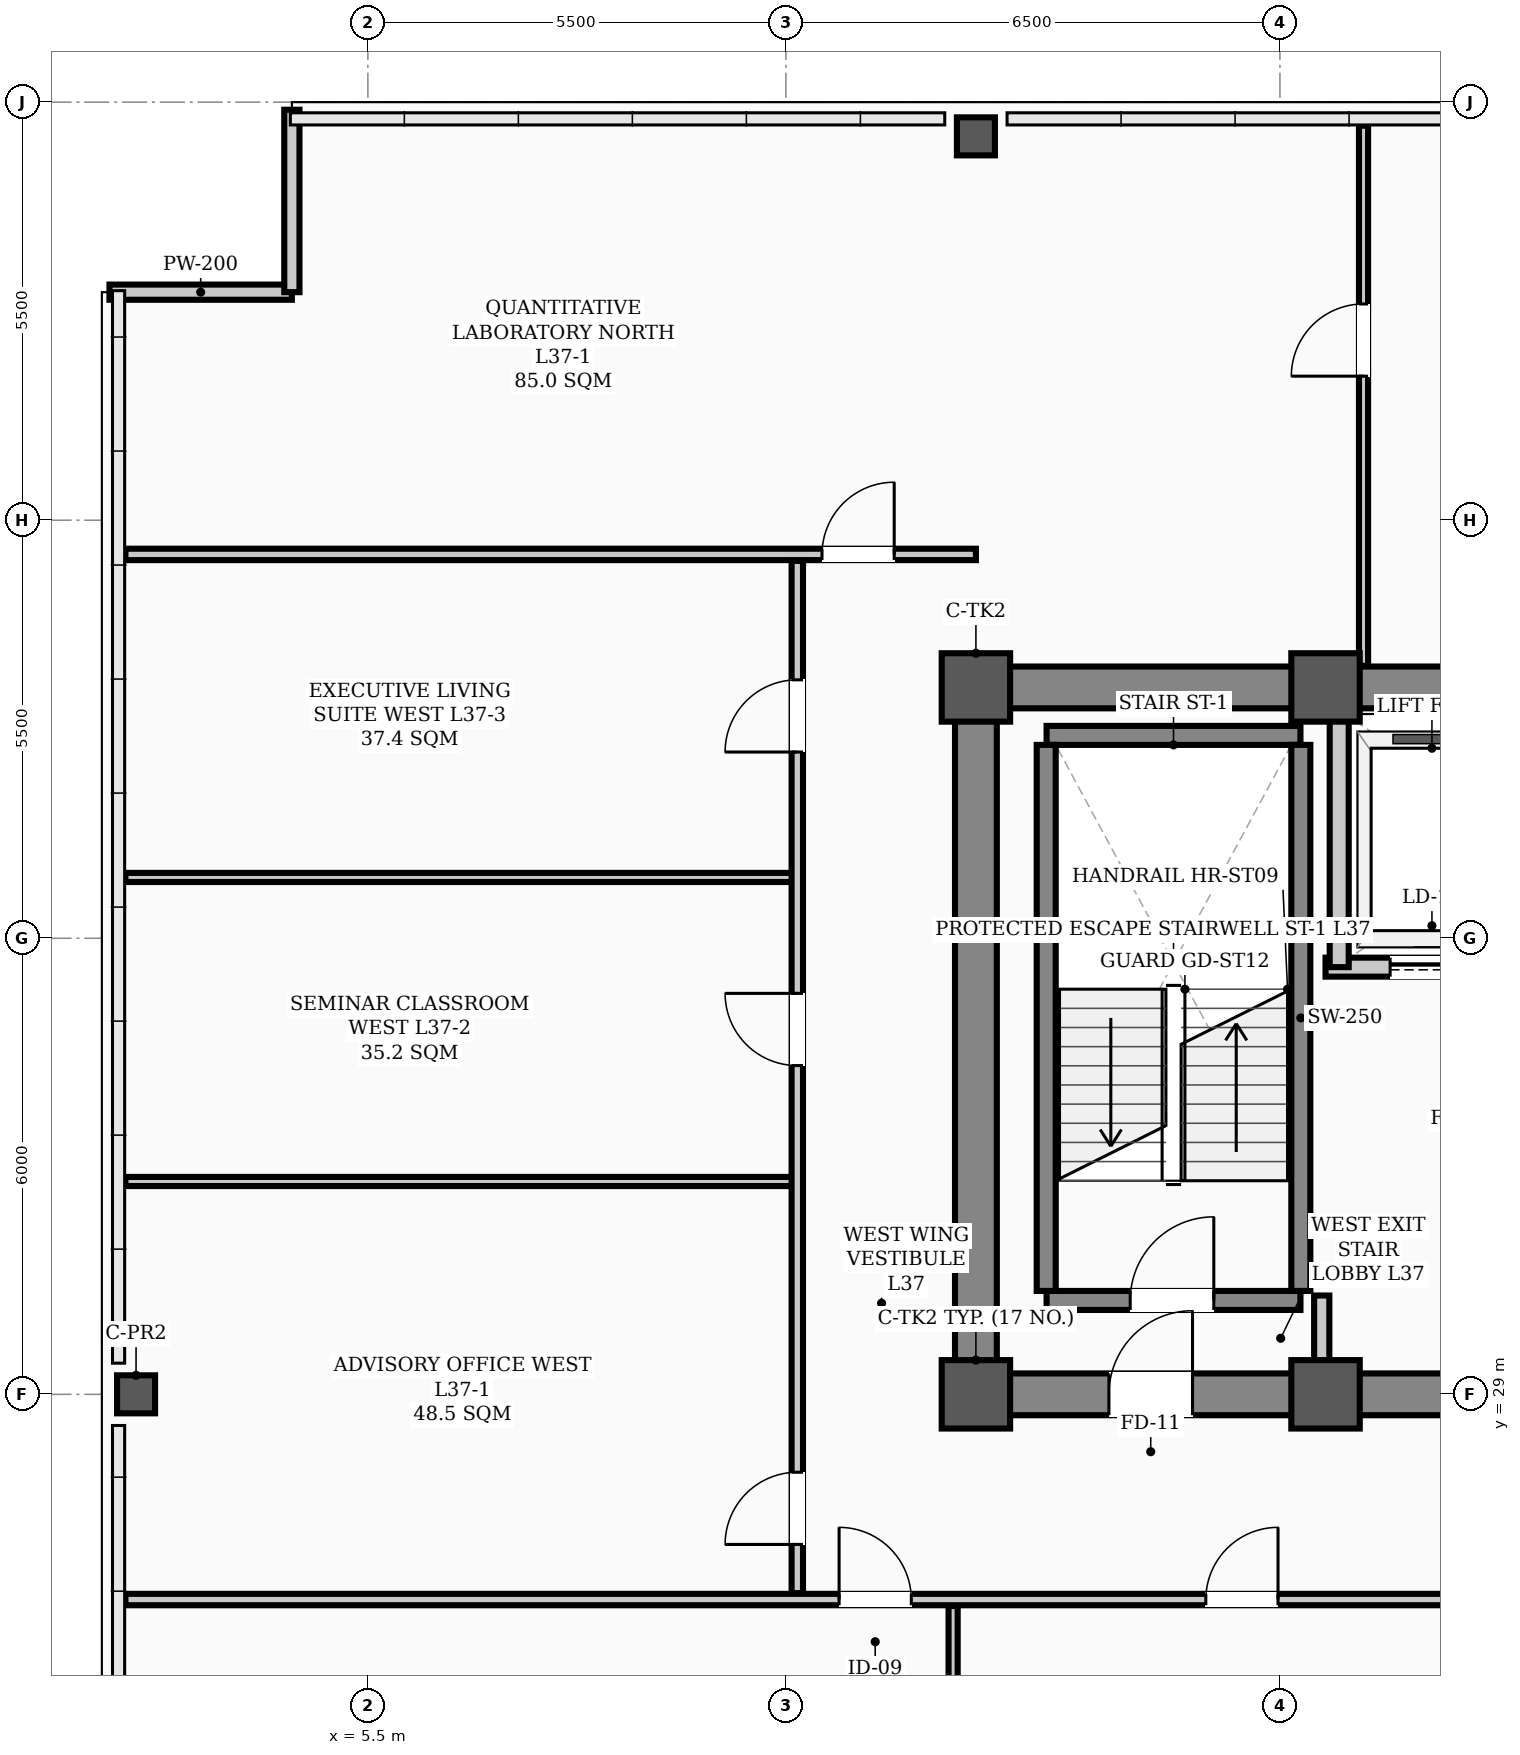
"""IFC4 building model, lengths in metres.
Left out: names, types, materials, properties, quantities, classifications, styles, units other than length and angle.
Written with IfcOpenShell. Run it as: python <this file> out.ifc"""

import sys

from ifc_helpers import new_model, si_unit, direction, frame, frame_2d, origin, origin_2d, place, context, subcontext, project, spatial, rectangle, hollow_rectangle, extrude, element, fill, save


model = new_model("IFC4")
c1 = context("Model", 3, precision=1e-05, world=origin(), true_north=direction((0.0, 1.0)))
c2 = subcontext(c1, "Body", "Model", "MODEL_VIEW")
j1 = project(units=[si_unit("LENGTHUNIT", "METRE"), si_unit("PLANEANGLEUNIT", "RADIAN")], contexts=[c1])
p1 = place(None, origin())
s1 = spatial("IfcSite", under=j1, at=p1, CompositionType="ELEMENT")
p2 = place(p1, origin())
s2 = spatial("IfcBuilding", under=s1, at=p2, CompositionType="ELEMENT")
p3 = place(p2, frame((0.0, 0.0, 150.0)))
s3 = spatial("IfcBuildingStorey", under=s2, at=p3, CompositionType="ELEMENT", Elevation=150.0)
for number, where, z_axis, x_axis in (
    (1, (13.5, 29.0, 0.0), (0.0, 0.0, 1.0), (1.0, 0.0, 0.0)),
    (2, (13.5, 38.3, 0.0), (0.0, 0.0, 1.0), (1.0, 0.0, 0.0)),
    (3, (18.1, 29.0, 0.0), (0.0, 0.0, 1.0), (1.0, 0.0, 0.0)),
    (4, (18.1, 38.3, 0.0), (0.0, 0.0, 1.0), (1.0, 0.0, 0.0)),
):
    element("IfcColumn", number, at=place(p3, frame(where, z_axis=z_axis, x_axis=x_axis)), inside=s3, PredefinedType="COLUMN", context=c2, shape_type="SweptSolid", body=[
        extrude(hollow_rectangle(XDim=0.9, YDim=0.9, WallThickness=0.035, InnerFilletRadius=0.017, OuterFilletRadius=0.052, at=origin_2d()), origin(), (0.0, 0.0, 1.0), 3.9),
    ])
for number, where, z_axis, x_axis in (
    (5, (2.45, 29.0, 0.0), (0.0, 0.0, 1.0), (1.0, 0.0, 0.0)),
    (6, (13.5, 45.55, 0.0), (0.0, 0.0, 1.0), (1.0, 0.0, 0.0)),
):
    element("IfcColumn", number, at=place(p3, frame(where, z_axis=z_axis, x_axis=x_axis)), inside=s3, PredefinedType="COLUMN", context=c2, shape_type="SweptSolid", body=[
        extrude(hollow_rectangle(XDim=0.5, YDim=0.5, WallThickness=0.024, InnerFilletRadius=0.012, OuterFilletRadius=0.036, at=origin_2d()), origin(), (0.0, 0.0, 1.0), 3.9),
    ])
for number, where, z_axis, x_axis in (
    (7, (2.1, 43.5, 0.0), (0.0, 0.0, 1.0), (1.0, 0.0, 0.0)),
    (8, (4.5, 43.5, 0.0), (0.0, 0.0, 1.0), (0.0, 1.0, 0.0)),
):
    element("IfcWall", number, at=place(p3, frame(where, z_axis=z_axis, x_axis=x_axis)), inside=s3, PredefinedType="PARAPET", context=c2, shape_type="SweptSolid", body=[
        extrude(rectangle(XDim=2.4, YDim=0.2, at=frame_2d((1.2, 0.0))), origin(), (0.0, 0.0, 1.0), 1.2),
    ])
p4 = place(p3, frame((13.5, 29.0, 0.0), z_axis=(0.0, 0.0, 1.0), x_axis=(1.0, 0.0, 0.0)))
e9 = element("IfcWall", 9, at=p4, inside=s3, PredefinedType="SHEAR", context=c2, shape_type="SweptSolid", body=[
    extrude(rectangle(XDim=30.5, YDim=0.55, at=frame_2d((15.25, 0.0))), origin(), (0.0, 0.0, 1.0), 3.72),
])
p5 = place(p4, frame((1.75, 0.0, 0.0)))
e10 = element("IfcOpeningElement", 10, at=p5, cuts=e9, PredefinedType="OPENING", context=c2, shape_type="SweptSolid", body=[
    extrude(rectangle(XDim=1.1, YDim=2.08, at=frame_2d((0.55, 1.04))), frame((0.0, 0.285, 0.0), z_axis=(0.0, -1.0, 0.0), x_axis=(1.0, 0.0, 0.0)), (0.0, 0.0, 1.0), 0.57),
])
p6 = place(p4, frame((26.7, 0.0, 0.0)))
e11 = element("IfcOpeningElement", 11, at=p6, cuts=e9, PredefinedType="OPENING", context=c2, shape_type="SweptSolid", body=[
    extrude(rectangle(XDim=1.1, YDim=2.08, at=frame_2d((0.55, 1.04))), frame((0.0, 0.285, 0.0), z_axis=(0.0, -1.0, 0.0), x_axis=(1.0, 0.0, 0.0)), (0.0, 0.0, 1.0), 0.57),
])
p7 = place(p4, frame((6.8, 0.0, 0.0)))
e12 = element("IfcOpeningElement", 12, at=p7, cuts=e9, PredefinedType="OPENING", context=c2, shape_type="SweptSolid", body=[
    extrude(rectangle(XDim=1.1, YDim=2.08, at=frame_2d((0.55, 1.04))), frame((0.0, 0.285, 0.0), z_axis=(0.0, -1.0, 0.0), x_axis=(1.0, 0.0, 0.0)), (0.0, 0.0, 1.0), 0.57),
])
p8 = place(p4, frame((13.2, 0.0, 0.0)))
e13 = element("IfcOpeningElement", 13, at=p8, cuts=e9, PredefinedType="OPENING", context=c2, shape_type="SweptSolid", body=[
    extrude(rectangle(XDim=1.6, YDim=2.08, at=frame_2d((0.8, 1.04))), frame((0.0, 0.285, 0.0), z_axis=(0.0, -1.0, 0.0), x_axis=(1.0, 0.0, 0.0)), (0.0, 0.0, 1.0), 0.57),
])
p9 = place(p4, frame((19.5, 0.0, 0.0)))
e14 = element("IfcOpeningElement", 14, at=p9, cuts=e9, PredefinedType="OPENING", context=c2, shape_type="SweptSolid", body=[
    extrude(rectangle(XDim=0.9, YDim=2.08, at=frame_2d((0.45, 1.04))), frame((0.0, 0.285, 0.0), z_axis=(0.0, -1.0, 0.0), x_axis=(1.0, 0.0, 0.0)), (0.0, 0.0, 1.0), 0.57),
])
p10 = place(p4, frame((21.55, 0.0, 0.0)))
e15 = element("IfcOpeningElement", 15, at=p10, cuts=e9, PredefinedType="OPENING", context=c2, shape_type="SweptSolid", body=[
    extrude(rectangle(XDim=0.9, YDim=2.08, at=frame_2d((0.45, 1.04))), frame((0.0, 0.285, 0.0), z_axis=(0.0, -1.0, 0.0), x_axis=(1.0, 0.0, 0.0)), (0.0, 0.0, 1.0), 0.57),
])
p11 = place(p3, frame((13.5, 38.3, 0.0), z_axis=(0.0, 0.0, 1.0), x_axis=(1.0, 0.0, 0.0)))
e16 = element("IfcWall", 16, at=p11, inside=s3, PredefinedType="SHEAR", context=c2, shape_type="SweptSolid", body=[
    extrude(rectangle(XDim=30.5, YDim=0.55, at=frame_2d((15.25, 0.0))), origin(), (0.0, 0.0, 1.0), 3.72),
])
p12 = place(p3, frame((13.5, 29.35, 0.0), z_axis=(0.0, 0.0, 1.0), x_axis=(0.0, 1.0, 0.0)))
e17 = element("IfcWall", 17, at=p12, inside=s3, PredefinedType="SHEAR", context=c2, shape_type="SweptSolid", body=[
    extrude(rectangle(XDim=8.6, YDim=0.55, at=frame_2d((4.3, 0.0))), origin(), (0.0, 0.0, 1.0), 3.72),
])
p13 = place(p3, frame((14.43, 30.235, 0.0), z_axis=(0.0, 0.0, 1.0), x_axis=(1.0, 0.0, 0.0)))
e18 = element("IfcWall", 18, at=p13, inside=s3, PredefinedType="STANDARD", context=c2, shape_type="SweptSolid", body=[
    extrude(rectangle(XDim=3.34, YDim=0.25, at=frame_2d((1.67, 0.0))), origin(), (0.0, 0.0, 1.0), 3.72),
])
p14 = place(p13, frame((1.1, 0.0, 0.0)))
e19 = element("IfcOpeningElement", 19, at=p14, cuts=e18, PredefinedType="OPENING", context=c2, shape_type="SweptSolid", body=[
    extrude(rectangle(XDim=1.1, YDim=2.08, at=frame_2d((0.55, 1.04))), frame((0.0, 0.135, 0.0), z_axis=(0.0, -1.0, 0.0), x_axis=(1.0, 0.0, 0.0)), (0.0, 0.0, 1.0), 0.27),
])
p15 = place(p3, frame((14.43, 37.669, 0.0), z_axis=(0.0, 0.0, 1.0), x_axis=(1.0, 0.0, 0.0)))
e20 = element("IfcWall", 20, at=p15, inside=s3, PredefinedType="STANDARD", context=c2, shape_type="SweptSolid", body=[
    extrude(rectangle(XDim=3.34, YDim=0.25, at=frame_2d((1.67, 0.0))), origin(), (0.0, 0.0, 1.0), 3.72),
])
for number, where, z_axis, x_axis in (
    (21, (14.425, 30.36, 0.0), (0.0, 0.0, 1.0), (0.0, 1.0, 0.0)),
    (22, (17.775, 30.36, 0.0), (0.0, 0.0, 1.0), (0.0, 1.0, 0.0)),
):
    element("IfcWall", number, at=place(p3, frame(where, z_axis=z_axis, x_axis=x_axis)), inside=s3, PredefinedType="STANDARD", context=c2, shape_type="SweptSolid", body=[
        extrude(rectangle(XDim=7.184, YDim=0.25, at=frame_2d((3.592, 0.0))), origin(), (0.0, 0.0, 1.0), 3.72),
    ])
p16 = place(p3, frame((18.1, 34.62, 0.0), z_axis=(0.0, 0.0, 1.0), x_axis=(1.0, 0.0, 0.0)))
e23 = element("IfcWall", 23, at=p16, inside=s3, PredefinedType="STANDARD", context=c2, shape_type="SweptSolid", body=[
    extrude(rectangle(XDim=5.35, YDim=0.25, at=frame_2d((2.675, 0.0))), origin(), (0.0, 0.0, 1.0), 3.72),
])
p17 = place(p16, frame((0.85, 0.0, 0.0)))
e24 = element("IfcOpeningElement", 24, at=p17, cuts=e23, PredefinedType="OPENING", context=c2, shape_type="SweptSolid", body=[
    extrude(rectangle(XDim=1.1, YDim=2.08, at=frame_2d((0.55, 1.04))), frame((0.0, 0.135, 0.0), z_axis=(0.0, -1.0, 0.0), x_axis=(1.0, 0.0, 0.0)), (0.0, 0.0, 1.0), 0.27),
])
p18 = place(p16, frame((3.45, 0.0, 0.0)))
e25 = element("IfcOpeningElement", 25, at=p18, cuts=e23, PredefinedType="OPENING", context=c2, shape_type="SweptSolid", body=[
    extrude(rectangle(XDim=1.1, YDim=2.08, at=frame_2d((0.55, 1.04))), frame((0.0, 0.135, 0.0), z_axis=(0.0, -1.0, 0.0), x_axis=(1.0, 0.0, 0.0)), (0.0, 0.0, 1.0), 0.27),
])
p19 = place(p3, frame((18.28, 34.62, 0.0), z_axis=(0.0, 0.0, 1.0), x_axis=(0.0, 1.0, 0.0)))
e26 = element("IfcWall", 26, at=p19, inside=s3, PredefinedType="STANDARD", context=c2, shape_type="SweptSolid", body=[
    extrude(rectangle(XDim=3.33, YDim=0.25, at=frame_2d((1.665, 0.0))), origin(), (0.0, 0.0, 1.0), 3.35),
])
p20 = place(p3, frame((2.31, 26.3, 0.0), z_axis=(0.0, 0.0, 1.0), x_axis=(1.0, 0.0, 0.0)))
e27 = element("IfcWall", 27, at=p20, inside=s3, PredefinedType="PARTITIONING", context=c2, shape_type="SweptSolid", body=[
    extrude(rectangle(XDim=46.38, YDim=0.15, at=frame_2d((23.19, 0.0))), origin(), (0.0, 0.0, 1.0), 3.2),
])
p21 = place(p20, frame((9.39, 0.0, 0.0)))
e28 = element("IfcOpeningElement", 28, at=p21, cuts=e27, PredefinedType="OPENING", context=c2, shape_type="SweptSolid", body=[
    extrude(rectangle(XDim=0.95, YDim=2.08, at=frame_2d((0.475, 1.04))), frame((0.0, 0.085, 0.0), z_axis=(0.0, -1.0, 0.0), x_axis=(1.0, 0.0, 0.0)), (0.0, 0.0, 1.0), 0.17),
])
p22 = place(p20, frame((14.215, 0.0, 0.0)))
e29 = element("IfcOpeningElement", 29, at=p22, cuts=e27, PredefinedType="OPENING", context=c2, shape_type="SweptSolid", body=[
    extrude(rectangle(XDim=0.95, YDim=2.08, at=frame_2d((0.475, 1.04))), frame((0.0, 0.085, 0.0), z_axis=(0.0, -1.0, 0.0), x_axis=(1.0, 0.0, 0.0)), (0.0, 0.0, 1.0), 0.17),
])
p23 = place(p20, frame((19.115, 0.0, 0.0)))
e30 = element("IfcOpeningElement", 30, at=p23, cuts=e27, PredefinedType="OPENING", context=c2, shape_type="SweptSolid", body=[
    extrude(rectangle(XDim=0.95, YDim=2.08, at=frame_2d((0.475, 1.04))), frame((0.0, 0.085, 0.0), z_axis=(0.0, -1.0, 0.0), x_axis=(1.0, 0.0, 0.0)), (0.0, 0.0, 1.0), 0.17),
])
p24 = place(p20, frame((23.065, 0.0, 0.0)))
e31 = element("IfcOpeningElement", 31, at=p24, cuts=e27, PredefinedType="OPENING", context=c2, shape_type="SweptSolid", body=[
    extrude(rectangle(XDim=0.95, YDim=2.08, at=frame_2d((0.475, 1.04))), frame((0.0, 0.085, 0.0), z_axis=(0.0, -1.0, 0.0), x_axis=(1.0, 0.0, 0.0)), (0.0, 0.0, 1.0), 0.17),
])
p25 = place(p20, frame((37.715, 0.0, 0.0)))
e32 = element("IfcOpeningElement", 32, at=p25, cuts=e27, PredefinedType="OPENING", context=c2, shape_type="SweptSolid", body=[
    extrude(rectangle(XDim=0.95, YDim=2.08, at=frame_2d((0.475, 1.04))), frame((0.0, 0.085, 0.0), z_axis=(0.0, -1.0, 0.0), x_axis=(1.0, 0.0, 0.0)), (0.0, 0.0, 1.0), 0.17),
])
p26 = place(p20, frame((43.66, 0.0, 0.0)))
e33 = element("IfcOpeningElement", 33, at=p26, cuts=e27, PredefinedType="OPENING", context=c2, shape_type="SweptSolid", body=[
    extrude(rectangle(XDim=0.95, YDim=2.08, at=frame_2d((0.475, 1.04))), frame((0.0, 0.085, 0.0), z_axis=(0.0, -1.0, 0.0), x_axis=(1.0, 0.0, 0.0)), (0.0, 0.0, 1.0), 0.17),
])
for number, where, z_axis, x_axis in (
    (34, (2.31, 31.8, 0.0), (0.0, 0.0, 1.0), (1.0, 0.0, 0.0)),
    (35, (2.31, 35.8, 0.0), (0.0, 0.0, 1.0), (1.0, 0.0, 0.0)),
):
    element("IfcWall", number, at=place(p3, frame(where, z_axis=z_axis, x_axis=x_axis)), inside=s3, PredefinedType="PARTITIONING", context=c2, shape_type="SweptSolid", body=[
        extrude(rectangle(XDim=8.84, YDim=0.12, at=frame_2d((4.42, 0.0))), origin(), (0.0, 0.0, 1.0), 3.72),
    ])
p27 = place(p3, frame((2.31, 40.05, 0.0), z_axis=(0.0, 0.0, 1.0), x_axis=(1.0, 0.0, 0.0)))
e36 = element("IfcWall", 36, at=p27, inside=s3, PredefinedType="PARTITIONING", context=c2, shape_type="SweptSolid", body=[
    extrude(rectangle(XDim=11.19, YDim=0.15, at=frame_2d((5.595, 0.0))), origin(), (0.0, 0.0, 1.0), 3.2),
])
p28 = place(p27, frame((9.165, 0.0, 0.0)))
e37 = element("IfcOpeningElement", 37, at=p28, cuts=e36, PredefinedType="OPENING", context=c2, shape_type="SweptSolid", body=[
    extrude(rectangle(XDim=0.95, YDim=2.08, at=frame_2d((0.475, 1.04))), frame((0.0, 0.085, 0.0), z_axis=(0.0, -1.0, 0.0), x_axis=(1.0, 0.0, 0.0)), (0.0, 0.0, 1.0), 0.17),
])
p29 = place(p3, frame((18.05, 29.285, 0.0), z_axis=(0.0, 0.0, 1.0), x_axis=(0.0, 1.0, 0.0)))
e38 = element("IfcWall", 38, at=p29, inside=s3, PredefinedType="STANDARD", context=c2, shape_type="SweptSolid", body=[
    extrude(rectangle(XDim=1.015, YDim=0.2, at=frame_2d((0.508, 0.0))), origin(), (0.0, 0.0, 1.0), 3.35),
])
p30 = place(p3, frame((11.15, 26.385, 0.0), z_axis=(0.0, 0.0, 1.0), x_axis=(0.0, 1.0, 0.0)))
e39 = element("IfcWall", 39, at=p30, inside=s3, PredefinedType="PARTITIONING", context=c2, shape_type="SweptSolid", body=[
    extrude(rectangle(XDim=13.58, YDim=0.15, at=frame_2d((6.79, 0.0))), origin(), (0.0, 0.0, 1.0), 3.1),
])
p31 = place(p30, frame((0.64, 0.0, 0.0)))
e40 = element("IfcOpeningElement", 40, at=p31, cuts=e39, PredefinedType="OPENING", context=c2, shape_type="SweptSolid", body=[
    extrude(rectangle(XDim=0.95, YDim=2.08, at=frame_2d((0.475, 1.04))), frame((0.0, 0.085, 0.0), z_axis=(0.0, -1.0, 0.0), x_axis=(1.0, 0.0, 0.0)), (0.0, 0.0, 1.0), 0.17),
])
p32 = place(p30, frame((6.94, 0.0, 0.0)))
e41 = element("IfcOpeningElement", 41, at=p32, cuts=e39, PredefinedType="OPENING", context=c2, shape_type="SweptSolid", body=[
    extrude(rectangle(XDim=0.95, YDim=2.08, at=frame_2d((0.475, 1.04))), frame((0.0, 0.085, 0.0), z_axis=(0.0, -1.0, 0.0), x_axis=(1.0, 0.0, 0.0)), (0.0, 0.0, 1.0), 0.17),
])
p33 = place(p30, frame((11.065, 0.0, 0.0)))
e42 = element("IfcOpeningElement", 42, at=p33, cuts=e39, PredefinedType="OPENING", context=c2, shape_type="SweptSolid", body=[
    extrude(rectangle(XDim=0.95, YDim=2.08, at=frame_2d((0.475, 1.04))), frame((0.0, 0.085, 0.0), z_axis=(0.0, -1.0, 0.0), x_axis=(1.0, 0.0, 0.0)), (0.0, 0.0, 1.0), 0.17),
])
p34 = place(p3, frame((13.2, 16.31, 0.0), z_axis=(0.0, 0.0, 1.0), x_axis=(0.0, 1.0, 0.0)))
e43 = element("IfcWall", 43, at=p34, inside=s3, PredefinedType="PARTITIONING", context=c2, shape_type="SweptSolid", body=[
    extrude(rectangle(XDim=9.905, YDim=0.12, at=frame_2d((4.953, 0.0))), origin(), (0.0, 0.0, 1.0), 3.1),
])
p35 = place(p3, frame((18.6, 38.585, 0.0), z_axis=(0.0, 0.0, 1.0), x_axis=(0.0, 1.0, 0.0)))
e44 = element("IfcWall", 44, at=p35, inside=s3, PredefinedType="PARTITIONING", context=c2, shape_type="SweptSolid", body=[
    extrude(rectangle(XDim=7.105, YDim=0.12, at=frame_2d((3.552, 0.0))), origin(), (0.0, 0.0, 1.0), 3.212),
])
p36 = place(p35, frame((3.81, 0.0, 0.0)))
e45 = element("IfcOpeningElement", 45, at=p36, cuts=e44, PredefinedType="OPENING", context=c2, shape_type="SweptSolid", body=[
    extrude(rectangle(XDim=0.95, YDim=2.08, at=frame_2d((0.475, 1.04))), frame((0.0, 0.07, 0.0), z_axis=(0.0, -1.0, 0.0), x_axis=(1.0, 0.0, 0.0)), (0.0, 0.0, 1.0), 0.14),
])
p37 = place(p14, origin())
e46 = element("IfcDoor", 46, at=p37, inside=s3, OperationType="SINGLE_SWING_RIGHT", PredefinedType="DOOR", context=c2, shape_type="SweptSolid", body=[
    extrude(rectangle(XDim=1.1, YDim=2.08, at=frame_2d((0.55, 1.04))), frame((0.0, 0.025, 0.0), z_axis=(0.0, -1.0, 0.0), x_axis=(1.0, 0.0, 0.0)), (0.0, 0.0, 1.0), 0.05),
])
fill(e19, e46)
p38 = place(p5, origin())
e47 = element("IfcDoor", 47, at=p38, inside=s3, OperationType="SINGLE_SWING_RIGHT", PredefinedType="DOOR", context=c2, shape_type="SweptSolid", body=[
    extrude(rectangle(XDim=1.1, YDim=2.08, at=frame_2d((0.55, 1.04))), frame((0.0, 0.025, 0.0), z_axis=(0.0, -1.0, 0.0), x_axis=(1.0, 0.0, 0.0)), (0.0, 0.0, 1.0), 0.05),
])
fill(e10, e47)
p39 = place(p21, origin())
e48 = element("IfcDoor", 48, at=p39, inside=s3, OperationType="SINGLE_SWING_LEFT", PredefinedType="DOOR", context=c2, shape_type="SweptSolid", body=[
    extrude(rectangle(XDim=0.95, YDim=2.08, at=frame_2d((0.475, 1.04))), frame((0.0, 0.025, 0.0), z_axis=(0.0, -1.0, 0.0), x_axis=(1.0, 0.0, 0.0)), (0.0, 0.0, 1.0), 0.05),
])
fill(e28, e48)
p40 = place(p22, origin())
e49 = element("IfcDoor", 49, at=p40, inside=s3, OperationType="SINGLE_SWING_RIGHT", PredefinedType="DOOR", context=c2, shape_type="SweptSolid", body=[
    extrude(rectangle(XDim=0.95, YDim=2.08, at=frame_2d((0.475, 1.04))), frame((0.0, 0.025, 0.0), z_axis=(0.0, -1.0, 0.0), x_axis=(1.0, 0.0, 0.0)), (0.0, 0.0, 1.0), 0.05),
])
fill(e29, e49)
p41 = place(p31, origin())
e50 = element("IfcDoor", 50, at=p41, inside=s3, OperationType="SINGLE_SWING_LEFT", PredefinedType="DOOR", context=c2, shape_type="SweptSolid", body=[
    extrude(rectangle(XDim=0.95, YDim=2.08, at=frame_2d((0.475, 1.04))), frame((0.0, 0.025, 0.0), z_axis=(0.0, -1.0, 0.0), x_axis=(1.0, 0.0, 0.0)), (0.0, 0.0, 1.0), 0.05),
])
fill(e40, e50)
p42 = place(p32, origin())
e51 = element("IfcDoor", 51, at=p42, inside=s3, OperationType="SINGLE_SWING_RIGHT", PredefinedType="DOOR", context=c2, shape_type="SweptSolid", body=[
    extrude(rectangle(XDim=0.95, YDim=2.08, at=frame_2d((0.475, 1.04))), frame((0.0, 0.025, 0.0), z_axis=(0.0, -1.0, 0.0), x_axis=(1.0, 0.0, 0.0)), (0.0, 0.0, 1.0), 0.05),
])
fill(e41, e51)
p43 = place(p33, origin())
e52 = element("IfcDoor", 52, at=p43, inside=s3, OperationType="SINGLE_SWING_LEFT", PredefinedType="DOOR", context=c2, shape_type="SweptSolid", body=[
    extrude(rectangle(XDim=0.95, YDim=2.08, at=frame_2d((0.475, 1.04))), frame((0.0, 0.025, 0.0), z_axis=(0.0, -1.0, 0.0), x_axis=(1.0, 0.0, 0.0)), (0.0, 0.0, 1.0), 0.05),
])
fill(e42, e52)
p44 = place(p28, origin())
e53 = element("IfcDoor", 53, at=p44, inside=s3, OperationType="SINGLE_SWING_RIGHT", PredefinedType="DOOR", context=c2, shape_type="SweptSolid", body=[
    extrude(rectangle(XDim=0.95, YDim=2.08, at=frame_2d((0.475, 1.04))), frame((0.0, 0.025, 0.0), z_axis=(0.0, -1.0, 0.0), x_axis=(1.0, 0.0, 0.0)), (0.0, 0.0, 1.0), 0.05),
])
fill(e37, e53)
p45 = place(p36, origin())
e54 = element("IfcDoor", 54, at=p45, inside=s3, OperationType="SINGLE_SWING_LEFT", PredefinedType="DOOR", context=c2, shape_type="SweptSolid", body=[
    extrude(rectangle(XDim=0.95, YDim=2.08, at=frame_2d((0.475, 1.04))), frame((0.0, 0.025, 0.0), z_axis=(0.0, -1.0, 0.0), x_axis=(1.0, 0.0, 0.0)), (0.0, 0.0, 1.0), 0.05),
])
fill(e45, e54)
p46 = place(p17, origin())
e55 = element("IfcDoor", 55, at=p46, inside=s3, OperationType="SLIDING_TO_LEFT", PredefinedType="DOOR", context=c2, shape_type="SweptSolid", body=[
    extrude(rectangle(XDim=1.1, YDim=2.08, at=frame_2d((0.55, 1.04))), frame((0.0, 0.025, 0.0), z_axis=(0.0, -1.0, 0.0), x_axis=(1.0, 0.0, 0.0)), (0.0, 0.0, 1.0), 0.05),
])
fill(e24, e55)
save(model, sys.argv[1])
